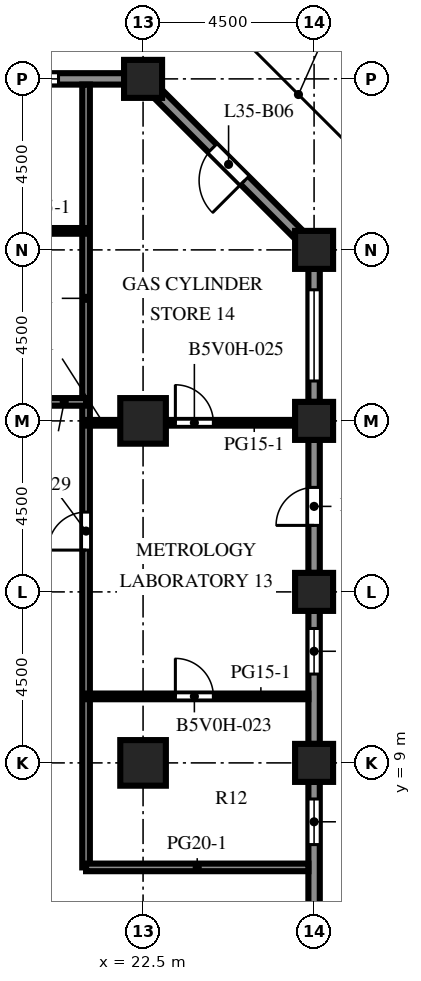
"""IFC4 building model, lengths in metres.
Left out: names, types, materials, properties, quantities, classifications, styles, units other than length and angle.
Written with IfcOpenShell. Run it as: python <this file> out.ifc"""

import sys

from ifc_helpers import new_model, si_unit, direction, frame, frame_2d, origin, origin_2d, place, context, subcontext, project, spatial, rectangle, extrude, element, fill, save


model = new_model("IFC4")
c1 = context("Model", 3, precision=1e-05, world=origin(), true_north=direction((0.0, 1.0)))
c2 = subcontext(c1, "Body", "Model", "MODEL_VIEW")
j1 = project(units=[si_unit("LENGTHUNIT", "METRE"), si_unit("PLANEANGLEUNIT", "RADIAN")], contexts=[c1])
p1 = place(None, origin())
s1 = spatial("IfcSite", under=j1, at=p1, CompositionType="ELEMENT")
p2 = place(p1, origin())
s2 = spatial("IfcBuilding", under=s1, at=p2, CompositionType="ELEMENT")
p3 = place(p2, frame((0.0, 0.0, 156.8)))
s3 = spatial("IfcBuildingStorey", under=s2, at=p3, CompositionType="ELEMENT", Elevation=156.8)
for number, where, z_axis, x_axis in (
    (1, (22.5, 27.0, 0.0), (0.0, 0.0, 1.0), (1.0, 0.0, 0.0)),
    (2, (27.0, 9.0, 0.0), (0.0, 0.0, 1.0), (1.0, 0.0, 0.0)),
    (3, (27.0, 13.5, 0.0), (0.0, 0.0, 1.0), (1.0, 0.0, 0.0)),
    (4, (27.0, 18.0, 0.0), (0.0, 0.0, 1.0), (1.0, 0.0, 0.0)),
    (5, (27.0, 22.5, 0.0), (0.0, 0.0, 1.0), (1.0, 0.0, 0.0)),
):
    element("IfcColumn", number, at=place(p3, frame(where, z_axis=z_axis, x_axis=x_axis)), inside=s3, PredefinedType="COLUMN", context=c2, shape_type="SweptSolid", body=[
        extrude(rectangle(XDim=1.0, YDim=1.0, at=origin_2d()), origin(), (0.0, 0.0, 1.0), 4.1),
    ])
for number, where, z_axis, x_axis in (
    (6, (22.5, 9.0, 0.0), (0.0, 0.0, 1.0), (1.0, 0.0, 0.0)),
    (7, (22.5, 18.0, 0.0), (0.0, 0.0, 1.0), (1.0, 0.0, 0.0)),
):
    element("IfcColumn", number, at=place(p3, frame(where, z_axis=z_axis, x_axis=x_axis)), inside=s3, PredefinedType="COLUMN", context=c2, shape_type="SweptSolid", body=[
        extrude(rectangle(XDim=1.2, YDim=1.2, at=origin_2d()), origin(), (0.0, 0.0, 1.0), 4.1),
    ])
p4 = place(p3, frame((27.0, 8.5, 0.0), z_axis=(0.0, 0.0, 1.0), x_axis=(0.0, -1.0, 0.0)))
e8 = element("IfcWall", 8, at=p4, inside=s3, PredefinedType="SOLIDWALL", context=c2, shape_type="SweptSolid", body=[
    extrude(rectangle(XDim=3.5, YDim=0.3, at=frame_2d((1.75, 0.0))), origin(), (0.0, 0.0, 1.0), 2.85),
])
p5 = place(p4, frame((0.45, 0.0, 0.8)))
e9 = element("IfcOpeningElement", 9, at=p5, cuts=e8, PredefinedType="OPENING", context=c2, shape_type="SweptSolid", body=[
    extrude(rectangle(XDim=1.2, YDim=1.7, at=frame_2d((0.6, 0.85))), frame((0.0, 0.16, 0.0), z_axis=(0.0, -1.0, 0.0), x_axis=(1.0, 0.0, 0.0)), (0.0, 0.0, 1.0), 0.32),
])
p6 = place(p3, frame((27.0, 13.0, 0.0), z_axis=(0.0, 0.0, 1.0), x_axis=(0.0, -1.0, 0.0)))
e10 = element("IfcWall", 10, at=p6, inside=s3, PredefinedType="SOLIDWALL", context=c2, shape_type="SweptSolid", body=[
    extrude(rectangle(XDim=3.5, YDim=0.3, at=frame_2d((1.75, 0.0))), origin(), (0.0, 0.0, 1.0), 2.85),
])
p7 = place(p6, frame((0.462, 0.0, 0.8)))
e11 = element("IfcOpeningElement", 11, at=p7, cuts=e10, PredefinedType="OPENING", context=c2, shape_type="SweptSolid", body=[
    extrude(rectangle(XDim=1.2, YDim=1.7, at=frame_2d((0.6, 0.85))), frame((0.0, 0.16, 0.0), z_axis=(0.0, -1.0, 0.0), x_axis=(1.0, 0.0, 0.0)), (0.0, 0.0, 1.0), 0.32),
])
p8 = place(p3, frame((27.0, 17.5, 0.0), z_axis=(0.0, 0.0, 1.0), x_axis=(0.0, -1.0, 0.0)))
e12 = element("IfcWall", 12, at=p8, inside=s3, PredefinedType="SOLIDWALL", context=c2, shape_type="SweptSolid", body=[
    extrude(rectangle(XDim=3.5, YDim=0.3, at=frame_2d((1.75, 0.0))), origin(), (0.0, 0.0, 1.0), 2.85),
])
p9 = place(p8, frame((1.25, 0.0, 0.0)))
e13 = element("IfcOpeningElement", 13, at=p9, cuts=e12, PredefinedType="OPENING", context=c2, shape_type="SweptSolid", body=[
    extrude(rectangle(XDim=1.0, YDim=2.2, at=frame_2d((0.5, 1.1))), frame((0.0, 0.16, 0.0), z_axis=(0.0, -1.0, 0.0), x_axis=(1.0, 0.0, 0.0)), (0.0, 0.0, 1.0), 0.32),
])
p10 = place(p3, frame((27.0, 22.0, 0.0), z_axis=(0.0, 0.0, 1.0), x_axis=(0.0, -1.0, 0.0)))
e14 = element("IfcWall", 14, at=p10, inside=s3, PredefinedType="SOLIDWALL", context=c2, shape_type="SweptSolid", body=[
    extrude(rectangle(XDim=3.5, YDim=0.3, at=frame_2d((1.75, 0.0))), origin(), (0.0, 0.0, 1.0), 2.85),
])
p11 = place(p10, frame((0.55, 0.0, 0.8)))
e15 = element("IfcOpeningElement", 15, at=p11, cuts=e14, PredefinedType="OPENING", context=c2, shape_type="SweptSolid", body=[
    extrude(rectangle(XDim=2.4, YDim=1.7, at=frame_2d((1.2, 0.85))), frame((0.0, 0.16, 0.0), z_axis=(0.0, -1.0, 0.0), x_axis=(1.0, 0.0, 0.0)), (0.0, 0.0, 1.0), 0.32),
])
p12 = place(p3, frame((22.894, 26.606, 0.0), z_axis=(0.0, 0.0, 1.0), x_axis=(0.707106781187, -0.707106781187, 0.0)))
e16 = element("IfcWall", 16, at=p12, inside=s3, PredefinedType="SOLIDWALL", context=c2, shape_type="SweptSolid", body=[
    extrude(rectangle(XDim=5.25, YDim=0.3, at=frame_2d((2.625, 0.0))), origin(), (0.0, 0.0, 1.0), 2.85),
])
p13 = place(p12, frame((2.025, 0.0, 0.0)))
e17 = element("IfcOpeningElement", 17, at=p13, cuts=e16, PredefinedType="OPENING", context=c2, shape_type="SweptSolid", body=[
    extrude(rectangle(XDim=1.2, YDim=2.2, at=frame_2d((0.6, 1.1))), frame((0.0, 0.16, 0.0), z_axis=(0.0, -1.0, 0.0), x_axis=(1.0, 0.0, 0.0)), (0.0, 0.0, 1.0), 0.32),
])
p14 = place(p3, frame((18.5, 27.0, 0.0), z_axis=(0.0, 0.0, 1.0), x_axis=(1.0, 0.0, 0.0)))
e18 = element("IfcWall", 18, at=p14, inside=s3, PredefinedType="SOLIDWALL", context=c2, shape_type="SweptSolid", body=[
    extrude(rectangle(XDim=3.5, YDim=0.3, at=frame_2d((1.75, 0.0))), origin(), (0.0, 0.0, 1.0), 2.85),
])
p15 = place(p14, frame((0.575, 0.0, 0.8)))
e19 = element("IfcOpeningElement", 19, at=p15, cuts=e18, PredefinedType="OPENING", context=c2, shape_type="SweptSolid", body=[
    extrude(rectangle(XDim=1.2, YDim=1.7, at=frame_2d((0.6, 0.85))), frame((0.0, 0.16, 0.0), z_axis=(0.0, -1.0, 0.0), x_axis=(1.0, 0.0, 0.0)), (0.0, 0.0, 1.0), 0.32),
])
p16 = place(p3, frame((21.0, 26.85, 0.0), z_axis=(0.0, 0.0, 1.0), x_axis=(0.0, -1.0, 0.0)))
e20 = element("IfcWall", 20, at=p16, inside=s3, PredefinedType="PARTITIONING", context=c2, shape_type="SweptSolid", body=[
    extrude(rectangle(XDim=20.6, YDim=0.2, at=frame_2d((10.3, 0.0))), origin(), (0.0, 0.0, 1.0), 3.65),
])
p17 = place(p16, frame((11.25, 0.0, 0.0)))
e21 = element("IfcOpeningElement", 21, at=p17, cuts=e20, PredefinedType="OPENING", context=c2, shape_type="SweptSolid", body=[
    extrude(rectangle(XDim=1.0, YDim=2.1, at=frame_2d((0.5, 1.05))), frame((0.0, 0.11, 0.0), z_axis=(0.0, -1.0, 0.0), x_axis=(1.0, 0.0, 0.0)), (0.0, 0.0, 1.0), 0.22),
])
p18 = place(p3, frame((21.0, 6.25, 0.0), z_axis=(0.0, 0.0, 1.0), x_axis=(1.0, 0.0, 0.0)))
e22 = element("IfcWall", 22, at=p18, inside=s3, PredefinedType="PARTITIONING", context=c2, shape_type="SweptSolid", body=[
    extrude(rectangle(XDim=5.85, YDim=0.2, at=frame_2d((2.925, 0.0))), origin(), (0.0, 0.0, 1.0), 3.65),
])
p19 = place(p3, frame((26.85, 10.75, 0.0), z_axis=(0.0, 0.0, 1.0), x_axis=(-1.0, 0.0, 0.0)))
e23 = element("IfcWall", 23, at=p19, inside=s3, PredefinedType="PARTITIONING", context=c2, shape_type="SweptSolid", body=[
    extrude(rectangle(XDim=5.85, YDim=0.15, at=frame_2d((2.925, 0.0))), origin(), (0.0, 0.0, 1.0), 3.65),
])
p20 = place(p19, frame((2.5, 0.0, 0.0)))
e24 = element("IfcOpeningElement", 24, at=p20, cuts=e23, PredefinedType="OPENING", context=c2, shape_type="SweptSolid", body=[
    extrude(rectangle(XDim=1.0, YDim=2.1, at=frame_2d((0.5, 1.05))), frame((0.0, 0.085, 0.0), z_axis=(0.0, -1.0, 0.0), x_axis=(1.0, 0.0, 0.0)), (0.0, 0.0, 1.0), 0.17),
])
p21 = place(p3, frame((21.0, 17.95, 0.0), z_axis=(0.0, 0.0, 1.0), x_axis=(1.0, 0.0, 0.0)))
e25 = element("IfcWall", 25, at=p21, inside=s3, PredefinedType="PARTITIONING", context=c2, shape_type="SweptSolid", body=[
    extrude(rectangle(XDim=0.9, YDim=0.15, at=frame_2d((0.45, 0.0))), origin(), (0.0, 0.0, 1.0), 3.65),
])
p22 = place(p3, frame((23.1, 17.95, 0.0), z_axis=(0.0, 0.0, 1.0), x_axis=(1.0, 0.0, 0.0)))
e26 = element("IfcWall", 26, at=p22, inside=s3, PredefinedType="PARTITIONING", context=c2, shape_type="SweptSolid", body=[
    extrude(rectangle(XDim=3.4, YDim=0.15, at=frame_2d((1.7, 0.0))), origin(), (0.0, 0.0, 1.0), 3.65),
])
p23 = place(p22, frame((0.25, 0.0, 0.0)))
e27 = element("IfcOpeningElement", 27, at=p23, cuts=e26, PredefinedType="OPENING", context=c2, shape_type="SweptSolid", body=[
    extrude(rectangle(XDim=1.0, YDim=2.1, at=frame_2d((0.5, 1.05))), frame((0.0, 0.085, 0.0), z_axis=(0.0, -1.0, 0.0), x_axis=(1.0, 0.0, 0.0)), (0.0, 0.0, 1.0), 0.17),
])
p24 = place(p3, frame((18.0, 18.5, 0.0), z_axis=(0.0, 0.0, 1.0), x_axis=(1.0, 0.0, 0.0)))
e28 = element("IfcWall", 28, at=p24, inside=s3, PredefinedType="PARTITIONING", context=c2, shape_type="SweptSolid", body=[
    extrude(rectangle(XDim=3.0, YDim=0.2, at=frame_2d((1.5, 0.0))), origin(), (0.0, 0.0, 1.0), 3.65),
])
p25 = place(p24, frame((0.85, 0.0, 0.0)))
e29 = element("IfcOpeningElement", 29, at=p25, cuts=e28, PredefinedType="OPENING", context=c2, shape_type="SweptSolid", body=[
    extrude(rectangle(XDim=1.0, YDim=2.1, at=frame_2d((0.5, 1.05))), frame((0.0, 0.11, 0.0), z_axis=(0.0, -1.0, 0.0), x_axis=(1.0, 0.0, 0.0)), (0.0, 0.0, 1.0), 0.22),
])
p26 = place(p3, frame((18.6, 23.0, 0.0), z_axis=(0.0, 0.0, 1.0), x_axis=(1.0, 0.0, 0.0)))
e30 = element("IfcWall", 30, at=p26, inside=s3, PredefinedType="PARTITIONING", context=c2, shape_type="SweptSolid", body=[
    extrude(rectangle(XDim=2.4, YDim=0.15, at=frame_2d((1.2, 0.0))), origin(), (0.0, 0.0, 1.0), 3.65),
])
p27 = place(p5, origin())
e31 = element("IfcWindow", 31, at=p27, inside=s3, PartitioningType="SINGLE_PANEL", PredefinedType="WINDOW", context=c2, shape_type="SweptSolid", body=[
    extrude(rectangle(XDim=1.2, YDim=1.7, at=frame_2d((0.6, 0.85))), frame((0.0, 0.03, 0.0), z_axis=(0.0, -1.0, 0.0), x_axis=(1.0, 0.0, 0.0)), (0.0, 0.0, 1.0), 0.06),
])
fill(e9, e31)
p28 = place(p7, origin())
e32 = element("IfcWindow", 32, at=p28, inside=s3, PartitioningType="SINGLE_PANEL", PredefinedType="WINDOW", context=c2, shape_type="SweptSolid", body=[
    extrude(rectangle(XDim=1.2, YDim=1.7, at=frame_2d((0.6, 0.85))), frame((0.0, 0.03, 0.0), z_axis=(0.0, -1.0, 0.0), x_axis=(1.0, 0.0, 0.0)), (0.0, 0.0, 1.0), 0.06),
])
fill(e11, e32)
p29 = place(p9, origin())
e33 = element("IfcDoor", 33, at=p29, inside=s3, OperationType="SINGLE_SWING_RIGHT", PredefinedType="DOOR", context=c2, shape_type="SweptSolid", body=[
    extrude(rectangle(XDim=1.0, YDim=2.2, at=frame_2d((0.5, 1.1))), frame((0.0, 0.025, 0.0), z_axis=(0.0, -1.0, 0.0), x_axis=(1.0, 0.0, 0.0)), (0.0, 0.0, 1.0), 0.05),
])
fill(e13, e33)
p30 = place(p11, origin())
e34 = element("IfcWindow", 34, at=p30, inside=s3, PartitioningType="SINGLE_PANEL", PredefinedType="WINDOW", context=c2, shape_type="SweptSolid", body=[
    extrude(rectangle(XDim=2.4, YDim=1.7, at=frame_2d((1.2, 0.85))), frame((0.0, 0.03, 0.0), z_axis=(0.0, -1.0, 0.0), x_axis=(1.0, 0.0, 0.0)), (0.0, 0.0, 1.0), 0.06),
])
fill(e15, e34)
p31 = place(p13, origin())
e35 = element("IfcDoor", 35, at=p31, inside=s3, OperationType="SINGLE_SWING_RIGHT", PredefinedType="DOOR", context=c2, shape_type="SweptSolid", body=[
    extrude(rectangle(XDim=1.2, YDim=2.2, at=frame_2d((0.6, 1.1))), frame((0.0, 0.025, 0.0), z_axis=(0.0, -1.0, 0.0), x_axis=(1.0, 0.0, 0.0)), (0.0, 0.0, 1.0), 0.05),
])
fill(e17, e35)
p32 = place(p15, origin())
e36 = element("IfcWindow", 36, at=p32, inside=s3, PartitioningType="SINGLE_PANEL", PredefinedType="WINDOW", context=c2, shape_type="SweptSolid", body=[
    extrude(rectangle(XDim=1.2, YDim=1.7, at=frame_2d((0.6, 0.85))), frame((0.0, 0.03, 0.0), z_axis=(0.0, -1.0, 0.0), x_axis=(1.0, 0.0, 0.0)), (0.0, 0.0, 1.0), 0.06),
])
fill(e19, e36)
p33 = place(p20, origin())
e37 = element("IfcDoor", 37, at=p33, inside=s3, OperationType="SINGLE_SWING_RIGHT", PredefinedType="DOOR", context=c2, shape_type="SweptSolid", body=[
    extrude(rectangle(XDim=1.0, YDim=2.1, at=frame_2d((0.5, 1.05))), frame((0.0, 0.025, 0.0), z_axis=(0.0, -1.0, 0.0), x_axis=(1.0, 0.0, 0.0)), (0.0, 0.0, 1.0), 0.05),
])
fill(e24, e37)
p34 = place(p23, origin())
e38 = element("IfcDoor", 38, at=p34, inside=s3, OperationType="SINGLE_SWING_LEFT", PredefinedType="DOOR", context=c2, shape_type="SweptSolid", body=[
    extrude(rectangle(XDim=1.0, YDim=2.1, at=frame_2d((0.5, 1.05))), frame((0.0, 0.025, 0.0), z_axis=(0.0, -1.0, 0.0), x_axis=(1.0, 0.0, 0.0)), (0.0, 0.0, 1.0), 0.05),
])
fill(e27, e38)
p35 = place(p17, origin())
e39 = element("IfcDoor", 39, at=p35, inside=s3, OperationType="SINGLE_SWING_RIGHT", PredefinedType="DOOR", context=c2, shape_type="SweptSolid", body=[
    extrude(rectangle(XDim=1.0, YDim=2.1, at=frame_2d((0.5, 1.05))), frame((0.0, 0.025, 0.0), z_axis=(0.0, -1.0, 0.0), x_axis=(1.0, 0.0, 0.0)), (0.0, 0.0, 1.0), 0.05),
])
fill(e21, e39)
save(model, sys.argv[1])
